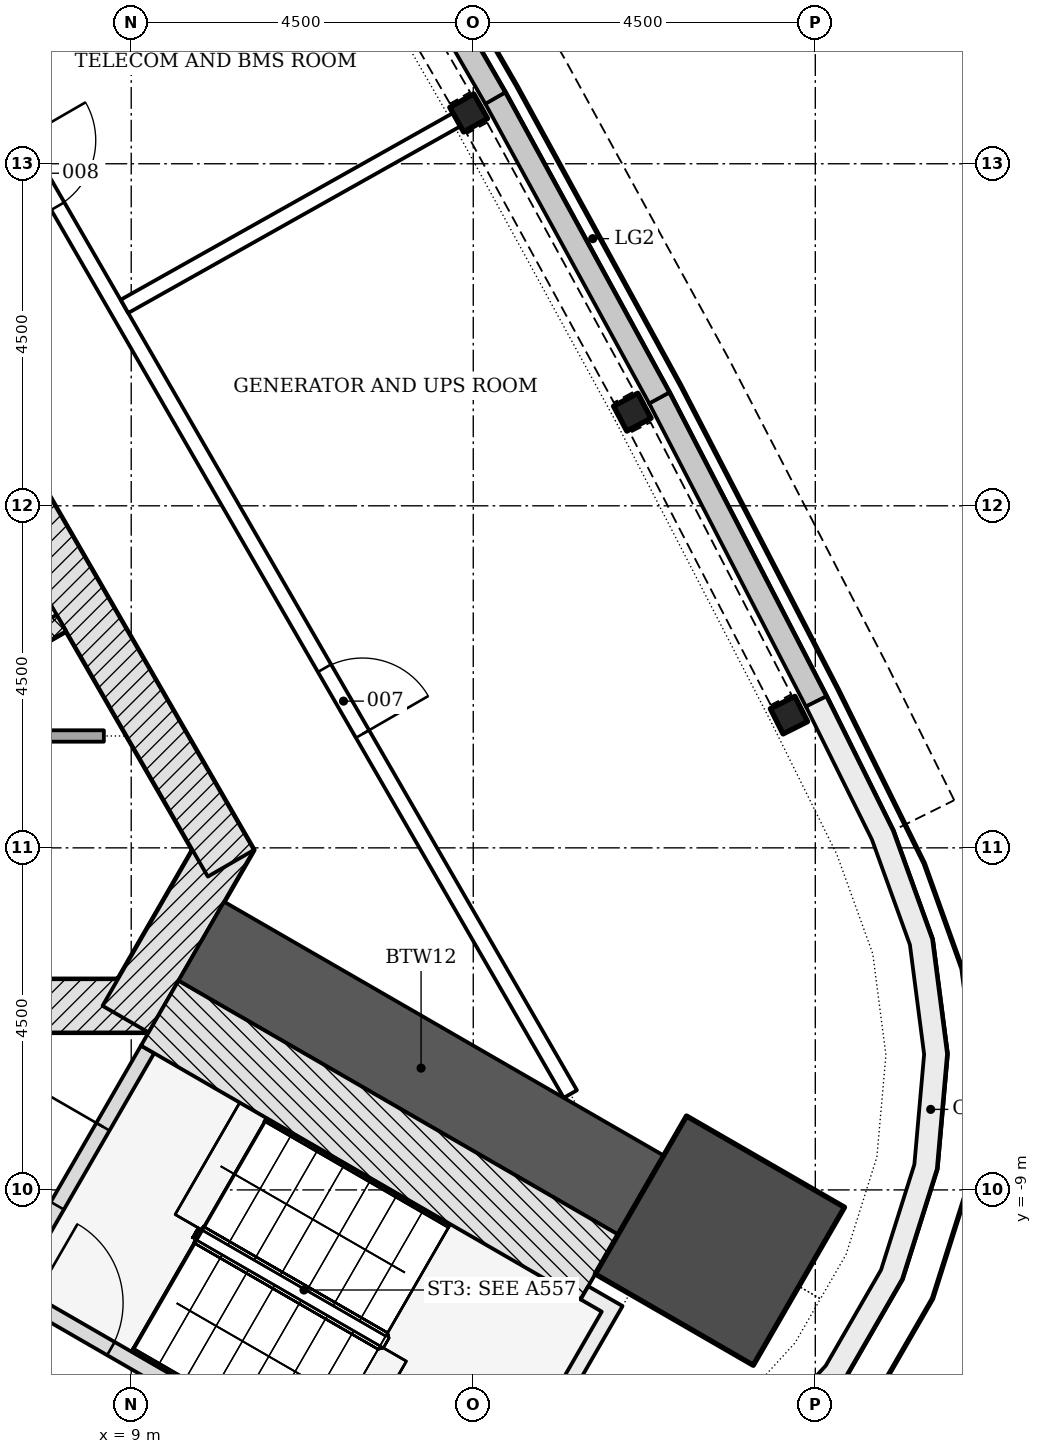
"""IFC4 building model, lengths in metres.
Left out: names, types, materials, properties, quantities, classifications, styles, units other than length and angle.
Written with IfcOpenShell. Run it as: python <this file> out.ifc"""

import sys

from ifc_helpers import new_model, si_unit, direction, frame, frame_2d, origin, origin_2d, place, context, subcontext, project, spatial, polyline, rectangle, i_section, outline, extrude, element, fill, save


model = new_model("IFC4")
c1 = context("Model", 3, precision=1e-05, world=origin(), true_north=direction((0.0, 1.0)))
c2 = subcontext(c1, "Body", "Model", "MODEL_VIEW")
j1 = project(units=[si_unit("LENGTHUNIT", "METRE"), si_unit("PLANEANGLEUNIT", "RADIAN")], contexts=[c1])
p1 = place(None, origin())
s1 = spatial("IfcSite", under=j1, at=p1, CompositionType="ELEMENT")
p2 = place(p1, origin())
s2 = spatial("IfcBuilding", under=s1, at=p2, CompositionType="ELEMENT")
p3 = place(p2, frame((0.0, 0.0, 258.0)))
s3 = spatial("IfcBuildingStorey", under=s2, at=p3, CompositionType="ELEMENT", Elevation=258.0)
p4 = place(p3, frame((-9.229, -6.578, -0.3), z_axis=(0.0, 0.0, 1.0), x_axis=(1.0, 0.0, 0.0)))
e1 = element("IfcWall", 1, at=p4, inside=s3, PredefinedType="SHEAR", context=c2, shape_type="SweptSolid", body=[
    extrude(rectangle(XDim=18.458, YDim=0.7, at=frame_2d((9.229, 0.0))), origin(), (0.0, 0.0, 1.0), 5.5),
])
p5 = place(p4, frame((8.7, 0.0, 0.3)))
e2 = element("IfcOpeningElement", 2, at=p5, cuts=e1, PredefinedType="OPENING", context=c2, shape_type="SweptSolid", body=[
    extrude(rectangle(XDim=1.0, YDim=2.1, at=frame_2d((0.5, 1.05))), frame((0.0, 0.36, 0.0), z_axis=(0.0, -1.0, 0.0), x_axis=(1.0, 0.0, 0.0)), (0.0, 0.0, 1.0), 0.72),
])
p6 = place(p4, frame((3.99, 0.0, 0.3)))
e3 = element("IfcOpeningElement", 3, at=p6, cuts=e1, PredefinedType="OPENING", context=c2, shape_type="SweptSolid", body=[
    extrude(rectangle(XDim=0.9, YDim=2.1, at=frame_2d((0.45, 1.05))), frame((0.0, 0.36, 0.0), z_axis=(0.0, -1.0, 0.0), x_axis=(1.0, 0.0, 0.0)), (0.0, 0.0, 1.0), 0.72),
])
p7 = place(p4, frame((13.539, 0.0, 0.3)))
e4 = element("IfcOpeningElement", 4, at=p7, cuts=e1, PredefinedType="OPENING", context=c2, shape_type="SweptSolid", body=[
    extrude(rectangle(XDim=0.9, YDim=2.1, at=frame_2d((0.45, 1.05))), frame((0.0, 0.36, 0.0), z_axis=(0.0, -1.0, 0.0), x_axis=(1.0, 0.0, 0.0)), (0.0, 0.0, 1.0), 0.72),
])
p8 = place(p3, frame((8.926, -6.753, -0.3), z_axis=(0.0, 0.0, 1.0), x_axis=(0.500042739161, 0.866000726912, 0.0)))
e5 = element("IfcWall", 5, at=p8, inside=s3, PredefinedType="SHEAR", context=c2, shape_type="SweptSolid", body=[
    extrude(rectangle(XDim=2.771, YDim=0.7, at=frame_2d((1.386, 0.0))), origin(), (0.0, 0.0, 1.0), 5.5),
])
p9 = place(p3, frame((10.311, -4.703, -0.3), z_axis=(0.0, 0.0, 1.0), x_axis=(-0.500001446645, 0.866024568562, 0.0)))
e6 = element("IfcWall", 6, at=p9, inside=s3, PredefinedType="SHEAR", context=c2, shape_type="SweptSolid", body=[
    extrude(rectangle(XDim=18.458, YDim=0.7, at=frame_2d((9.229, 0.0))), origin(), (0.0, 0.0, 1.0), 5.5),
])
p10 = place(p3, frame((9.922, -5.728, -0.3), z_axis=(0.0, 0.0, 1.0), x_axis=(0.866032176823, -0.499988268569, 0.0)))
e7 = element("IfcWall", 7, at=p10, inside=s3, PredefinedType="SHEAR", context=c2, shape_type="SweptSolid", body=[
    extrude(rectangle(XDim=6.678, YDim=1.2, at=frame_2d((3.339, 0.0))), origin(), (0.0, 0.0, 1.0), 5.5),
])
p11 = place(p3, frame((16.745, -9.667, -0.3), z_axis=(0.0, 0.0, 1.0), x_axis=(0.866025403784, -0.5, 0.0)))
e8 = element("IfcColumn", 8, at=p11, inside=s3, PredefinedType="COLUMN", context=c2, shape_type="SweptSolid", body=[
    extrude(rectangle(XDim=2.4, YDim=2.4, at=origin_2d()), origin(), (0.0, 0.0, 1.0), 5.5),
])
for number, where, z_axis, x_axis in (
    (9, (17.654, -2.754, -0.3), (0.0, 0.0, 1.0), (-0.449, 0.894, 0.0)),
    (10, (15.593, 1.232, -0.3), (0.0, 0.0, 1.0), (-0.47, 0.883, 0.0)),
    (11, (13.44, 5.169, -0.3), (0.0, 0.0, 1.0), (-0.49, 0.872, 0.0)),
):
    element("IfcColumn", number, at=place(p3, frame(where, z_axis=z_axis, x_axis=x_axis)), inside=s3, PredefinedType="COLUMN", context=c2, shape_type="SweptSolid", body=[
        extrude(i_section(OverallWidth=0.371, OverallDepth=0.361, WebThickness=0.012, FlangeThickness=0.02, FilletRadius=0.015, at=origin_2d()), origin(), (0.0, 0.0, 1.0), 5.5),
    ])
p12 = place(p3, origin())
e12 = element("IfcWall", 12, at=p12, inside=s3, PredefinedType="NOTDEFINED", context=c2, shape_type="SweptSolid", body=[
    extrude(outline(polyline([(18.145, -2.507), (16.078, 1.49), (15.812, 1.352), (17.878, -2.645), (18.145, -2.507)])), origin(), (0.0, 0.0, 1.0), 1.2),
])
p13 = place(p3, origin())
e13 = element("IfcWall", 13, at=p13, inside=s3, PredefinedType="NOTDEFINED", context=c2, shape_type="SweptSolid", body=[
    extrude(outline(polyline([(16.078, 1.49), (13.919, 5.438), (13.656, 5.294), (15.815, 1.346), (16.078, 1.49)])), origin(), (0.0, 0.0, 1.0), 1.2),
])
p14 = place(p3, origin())
e14 = element("IfcWall", 14, at=p14, inside=s3, PredefinedType="NOTDEFINED", context=c2, shape_type="SweptSolid", body=[
    extrude(outline(polyline([(13.919, 5.438), (11.669, 9.335), (11.409, 9.185), (13.659, 5.288), (13.919, 5.438)])), origin(), (0.0, 0.0, 1.0), 1.2),
])
p15 = place(p3, origin())
e15 = element("IfcWall", 15, at=p15, inside=s3, PredefinedType="NOTDEFINED", context=c2, shape_type="SweptSolid", body=[
    extrude(outline(polyline([(11.244, -14.46), (13.211, -14.336), (14.708, -14.069), (16.111, -13.485), (17.355, -12.611), (18.381, -11.49), (19.141, -10.174), (19.599, -8.724), (19.733, -7.21), (19.538, -5.703), (19.021, -4.273), (18.145, -2.507), (17.876, -2.64), (18.745, -4.391), (19.244, -5.774), (19.432, -7.216), (19.303, -8.665), (18.865, -10.052), (18.138, -11.312), (17.156, -12.385), (15.965, -13.22), (14.623, -13.779), (13.176, -14.038), (11.225, -14.161), (11.244, -14.46)])), origin(), (0.0, 0.0, 1.0), 5.2),
])
p16 = place(p3, frame((8.081, -1.541, -0.3), z_axis=(0.0, 0.0, 1.0), x_axis=(-0.866022959057, -0.500004234368, 0.0)))
e16 = element("IfcWall", 16, at=p16, inside=s3, PredefinedType="PARTITIONING", context=c2, shape_type="SweptSolid", body=[
    extrude(rectangle(XDim=2.5, YDim=0.25, at=frame_2d((1.25, 0.0))), origin(), (0.0, 0.0, 1.0), 5.5),
])
p17 = place(p3, frame((1.071, -3.028, 0.0), z_axis=(0.0, 0.0, 1.0), x_axis=(1.0, 0.0, 0.0)))
e17 = element("IfcWall", 17, at=p17, inside=s3, PredefinedType="PARTITIONING", context=c2, shape_type="SweptSolid", body=[
    extrude(rectangle(XDim=7.569, YDim=0.15, at=frame_2d((3.784, 0.0))), origin(), (0.0, 0.0, 1.0), 5.2),
])
p18 = place(p3, frame((7.44, -10.226, -0.3), z_axis=(0.0, 0.0, 1.0), x_axis=(0.500022077904, 0.866012656725, 0.0)))
e18 = element("IfcWall", 18, at=p18, inside=s3, PredefinedType="SHEAR", context=c2, shape_type="SweptSolid", body=[
    extrude(rectangle(XDim=3.55, YDim=0.2, at=frame_2d((1.775, 0.0))), origin(), (0.0, 0.0, 1.0), 5.5),
])
p19 = place(p18, frame((1.175, 0.0, 0.3)))
e19 = element("IfcOpeningElement", 19, at=p19, cuts=e18, PredefinedType="OPENING", context=c2, shape_type="SweptSolid", body=[
    extrude(rectangle(XDim=1.2, YDim=2.1, at=frame_2d((0.6, 1.05))), frame((0.0, 0.11, 0.0), z_axis=(0.0, -1.0, 0.0), x_axis=(1.0, 0.0, 0.0)), (0.0, 0.0, 1.0), 0.22),
])
p20 = place(p3, frame((7.304, -10.262, -0.3), z_axis=(0.0, 0.0, 1.0), x_axis=(0.866026594901, -0.49999793692, 0.0)))
e20 = element("IfcWall", 20, at=p20, inside=s3, PredefinedType="SHEAR", context=c2, shape_type="SweptSolid", body=[
    extrude(rectangle(XDim=5.6, YDim=0.2, at=frame_2d((2.8, 0.0))), origin(), (0.0, 0.0, 1.0), 5.5),
])
p21 = place(p20, frame((0.45, 0.0, 0.3)))
e21 = element("IfcOpeningElement", 21, at=p21, cuts=e20, PredefinedType="OPENING", context=c2, shape_type="SweptSolid", body=[
    extrude(rectangle(XDim=1.2, YDim=2.1, at=frame_2d((0.6, 1.05))), frame((0.0, 0.11, 0.0), z_axis=(0.0, -1.0, 0.0), x_axis=(1.0, 0.0, 0.0)), (0.0, 0.0, 1.0), 0.22),
])
p22 = place(p3, frame((9.375, -6.675, -0.3), z_axis=(0.0, 0.0, 1.0), x_axis=(0.866025486527, -0.499999856685, 0.0)))
e22 = element("IfcWall", 22, at=p22, inside=s3, PredefinedType="SHEAR", context=c2, shape_type="SweptSolid", body=[
    extrude(rectangle(XDim=6.679, YDim=0.986, at=frame_2d((3.339, 0.0))), origin(), (0.0, 0.0, 1.0), 5.5),
])
p23 = place(p3, frame((0.0, 0.0, -0.3)))
e23 = element("IfcWall", 23, at=p23, inside=s3, PredefinedType="SHEAR", context=c2, shape_type="SweptSolid", body=[
    extrude(outline(polyline([(12.104, -13.149), (14.289, -12.563), (15.464, -10.528), (15.013, -10.268), (14.913, -10.441), (15.191, -10.601), (14.157, -12.392), (12.132, -12.934), (12.204, -12.976), (12.204, -12.976), (12.204, -12.976), (12.204, -12.976), (12.204, -12.976), (12.204, -12.976), (12.204, -12.976), (12.204, -12.976), (12.204, -12.976), (12.204, -12.976), (12.204, -12.976), (12.204, -12.976), (12.204, -12.976), (12.204, -12.976), (12.204, -12.976), (12.204, -12.976), (12.204, -12.976), (12.104, -13.149)])), origin(), (0.0, 0.0, 1.0), 5.5),
])
p24 = place(p3, frame((5.282, 8.708, 0.0), z_axis=(0.0, 0.0, 1.0), x_axis=(0.500007704848, -0.866020955343, 0.0)))
e24 = element("IfcWall", 24, at=p24, inside=s3, PredefinedType="PARTITIONING", context=c2, shape_type="SweptSolid", body=[
    extrude(rectangle(XDim=18.991, YDim=0.2, at=frame_2d((9.496, 0.0))), origin(), (0.0, 0.0, 1.0), 4.652),
])
p25 = place(p24, frame((12.521, 0.0, 0.0)))
e25 = element("IfcOpeningElement", 25, at=p25, cuts=e24, PredefinedType="OPENING", context=c2, shape_type="SweptSolid", body=[
    extrude(rectangle(XDim=1.0, YDim=2.1, at=frame_2d((0.5, 1.05))), frame((0.0, 0.11, 0.0), z_axis=(0.0, -1.0, 0.0), x_axis=(1.0, 0.0, 0.0)), (0.0, 0.0, 1.0), 0.22),
])
p26 = place(p24, frame((4.502, 0.0, 0.0)))
e26 = element("IfcOpeningElement", 26, at=p26, cuts=e24, PredefinedType="OPENING", context=c2, shape_type="SweptSolid", body=[
    extrude(rectangle(XDim=1.0, YDim=2.1, at=frame_2d((0.5, 1.05))), frame((0.0, 0.11, 0.0), z_axis=(0.0, -1.0, 0.0), x_axis=(1.0, 0.0, 0.0)), (0.0, 0.0, 1.0), 0.22),
])
p27 = place(p24, frame((0.965, 0.0, 0.0)))
e27 = element("IfcOpeningElement", 27, at=p27, cuts=e24, PredefinedType="OPENING", context=c2, shape_type="SweptSolid", body=[
    extrude(rectangle(XDim=1.0, YDim=2.1, at=frame_2d((0.5, 1.05))), frame((0.0, 0.11, 0.0), z_axis=(0.0, -1.0, 0.0), x_axis=(1.0, 0.0, 0.0)), (0.0, 0.0, 1.0), 0.22),
])
p28 = place(p3, frame((8.911, 2.624, 0.0), z_axis=(0.0, 0.0, 1.0), x_axis=(0.871756434121, 0.48993950603, 0.0)))
e28 = element("IfcWall", 28, at=p28, inside=s3, PredefinedType="PARTITIONING", context=c2, shape_type="SweptSolid", body=[
    extrude(rectangle(XDim=5.044, YDim=0.2, at=frame_2d((2.522, 0.0))), origin(), (0.0, 0.0, 1.0), 4.652),
])
p29 = place(p19, origin())
e29 = element("IfcDoor", 29, at=p29, inside=s3, OperationType="SINGLE_SWING_RIGHT", PredefinedType="DOOR", context=c2, shape_type="SweptSolid", body=[
    extrude(rectangle(XDim=1.2, YDim=2.1, at=frame_2d((0.6, 1.05))), frame((0.0, 0.025, 0.0), z_axis=(0.0, -1.0, 0.0), x_axis=(1.0, 0.0, 0.0)), (0.0, 0.0, 1.0), 0.05),
])
fill(e19, e29)
p30 = place(p21, origin())
e30 = element("IfcDoor", 30, at=p30, inside=s3, OperationType="SINGLE_SWING_LEFT", PredefinedType="DOOR", context=c2, shape_type="SweptSolid", body=[
    extrude(rectangle(XDim=1.2, YDim=2.1, at=frame_2d((0.6, 1.05))), frame((0.0, 0.025, 0.0), z_axis=(0.0, -1.0, 0.0), x_axis=(1.0, 0.0, 0.0)), (0.0, 0.0, 1.0), 0.05),
])
fill(e21, e30)
p31 = place(p25, origin())
e31 = element("IfcDoor", 31, at=p31, inside=s3, OperationType="SINGLE_SWING_RIGHT", PredefinedType="DOOR", context=c2, shape_type="SweptSolid", body=[
    extrude(rectangle(XDim=1.0, YDim=2.1, at=frame_2d((0.5, 1.05))), frame((0.0, 0.025, 0.0), z_axis=(0.0, -1.0, 0.0), x_axis=(1.0, 0.0, 0.0)), (0.0, 0.0, 1.0), 0.05),
])
fill(e25, e31)
p32 = place(p26, origin())
e32 = element("IfcDoor", 32, at=p32, inside=s3, OperationType="SINGLE_SWING_LEFT", PredefinedType="DOOR", context=c2, shape_type="SweptSolid", body=[
    extrude(rectangle(XDim=1.0, YDim=2.1, at=frame_2d((0.5, 1.05))), frame((0.0, 0.025, 0.0), z_axis=(0.0, -1.0, 0.0), x_axis=(1.0, 0.0, 0.0)), (0.0, 0.0, 1.0), 0.05),
])
fill(e26, e32)
save(model, sys.argv[1])
